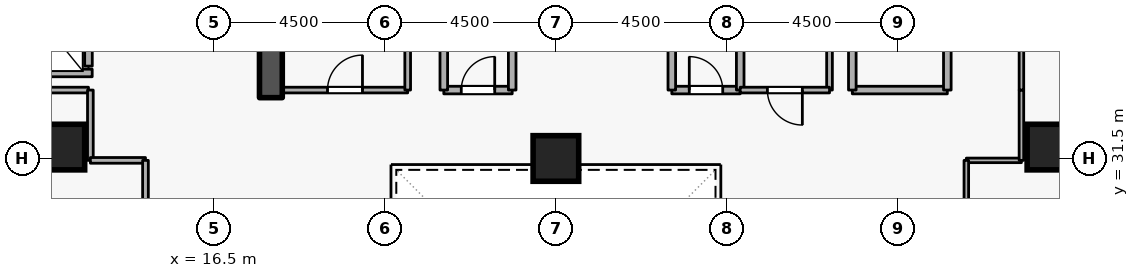
"""IFC4 building model, lengths in metres.
Left out: names, types, materials, properties, quantities, classifications, styles, units other than length and angle.
Written with IfcOpenShell. Run it as: python <this file> out.ifc"""

import sys

from ifc_helpers import new_model, si_unit, direction, frame, frame_2d, origin, origin_2d, place, context, subcontext, project, spatial, rectangle, extrude, element, fill, save


model = new_model("IFC4")
c1 = context("Model", 3, precision=1e-05, world=origin(), true_north=direction((0.0, 1.0)))
c2 = subcontext(c1, "Body", "Model", "MODEL_VIEW")
j1 = project(units=[si_unit("LENGTHUNIT", "METRE"), si_unit("PLANEANGLEUNIT", "RADIAN")], contexts=[c1])
p1 = place(None, origin())
s1 = spatial("IfcSite", under=j1, at=p1, CompositionType="ELEMENT")
p2 = place(p1, origin())
s2 = spatial("IfcBuilding", under=s1, at=p2, CompositionType="ELEMENT")
p3 = place(p2, frame((0.0, 0.0, 101.7)))
s3 = spatial("IfcBuildingStorey", under=s2, at=p3, CompositionType="ELEMENT", Elevation=101.7)
p4 = place(p3, frame((18.0, 33.1, 0.0), z_axis=(0.0, 0.0, 1.0), x_axis=(0.0, 1.0, 0.0)))
e1 = element("IfcWall", 1, at=p4, inside=s3, PredefinedType="SHEAR", context=c2, shape_type="SweptSolid", body=[
    extrude(rectangle(XDim=5.7, YDim=0.6, at=frame_2d((2.85, 0.0))), origin(), (0.0, 0.0, 1.0), 3.6),
])
for number, where, z_axis, x_axis in (
    (2, (12.5, 31.8, 0.0), (0.0, 0.0, 1.0), (1.0, 0.0, 0.0)),
    (3, (38.5, 31.8, 0.0), (0.0, 0.0, 1.0), (1.0, 0.0, 0.0)),
    (4, (25.5, 31.5, 0.0), (0.0, 0.0, 1.0), (1.0, 0.0, 0.0)),
):
    element("IfcColumn", number, at=place(p3, frame(where, z_axis=z_axis, x_axis=x_axis)), inside=s3, PredefinedType="COLUMN", context=c2, shape_type="SweptSolid", body=[
        extrude(rectangle(XDim=1.2, YDim=1.2, at=origin_2d()), origin(), (0.0, 0.0, 1.0), 3.6),
    ])
p5 = place(p3, frame((13.2, 33.93, 0.0), z_axis=(0.0, 0.0, 1.0), x_axis=(0.0, 1.0, 0.0)))
e5 = element("IfcWall", 5, at=p5, inside=s3, PredefinedType="STANDARD", context=c2, shape_type="SweptSolid", body=[
    extrude(rectangle(XDim=1.94, YDim=0.2, at=frame_2d((0.97, 0.0))), origin(), (0.0, 0.0, 1.0), 3.34),
])
p6 = place(p5, frame((0.46, 0.0, 0.0)))
e6 = element("IfcOpeningElement", 6, at=p6, cuts=e5, PredefinedType="OPENING", context=c2, shape_type="SweptSolid", body=[
    extrude(rectangle(XDim=1.02, YDim=2.06, at=frame_2d((0.51, 1.03))), frame((0.0, 0.11, 0.0), z_axis=(0.0, -1.0, 0.0), x_axis=(1.0, 0.0, 0.0)), (0.0, 0.0, 1.0), 0.22),
])
p7 = place(p3, frame((11.002, 33.75, 0.0), z_axis=(0.0, 0.0, 1.0), x_axis=(1.0, 0.0, 0.0)))
e7 = element("IfcWall", 7, at=p7, inside=s3, PredefinedType="STANDARD", context=c2, shape_type="SweptSolid", body=[
    extrude(rectangle(XDim=2.296, YDim=0.2, at=frame_2d((1.148, 0.0))), origin(), (0.0, 0.0, 1.0), 3.34),
])
p8 = place(p3, frame((33.3, 33.3, 0.0), z_axis=(0.0, 0.0, 1.0), x_axis=(1.0, 0.0, 0.0)))
e8 = element("IfcWall", 8, at=p8, inside=s3, PredefinedType="STANDARD", context=c2, shape_type="SweptSolid", body=[
    extrude(rectangle(XDim=2.5, YDim=0.2, at=frame_2d((1.25, 0.0))), origin(), (0.0, 0.0, 1.0), 3.34),
])
p9 = place(p3, frame((35.8, 33.3, 0.0), z_axis=(0.0, 0.0, 1.0), x_axis=(0.0, 1.0, 0.0)))
e9 = element("IfcWall", 9, at=p9, inside=s3, PredefinedType="STANDARD", context=c2, shape_type="SweptSolid", body=[
    extrude(rectangle(XDim=5.7, YDim=0.2, at=frame_2d((2.85, 0.0))), origin(), (0.0, 0.0, 1.0), 3.34),
])
p10 = place(p9, frame((2.275, 0.0, 0.0)))
e10 = element("IfcOpeningElement", 10, at=p10, cuts=e9, PredefinedType="OPENING", context=c2, shape_type="SweptSolid", body=[
    extrude(rectangle(XDim=1.15, YDim=2.1, at=frame_2d((0.575, 1.05))), frame((0.0, 0.11, 0.0), z_axis=(0.0, -1.0, 0.0), x_axis=(1.0, 0.0, 0.0)), (0.0, 0.0, 1.0), 0.22),
])
p11 = place(p3, frame((33.3, 35.6, 0.0), z_axis=(0.0, 0.0, 1.0), x_axis=(0.0, -1.0, 0.0)))
e11 = element("IfcWall", 11, at=p11, inside=s3, PredefinedType="STANDARD", context=c2, shape_type="SweptSolid", body=[
    extrude(rectangle(XDim=2.3, YDim=0.2, at=frame_2d((1.15, 0.0))), origin(), (0.0, 0.0, 1.0), 2.545),
])
p12 = place(p3, frame((22.55, 33.3, 0.0), z_axis=(0.0, 0.0, 1.0), x_axis=(1.0, 0.0, 0.0)))
e12 = element("IfcWall", 12, at=p12, inside=s3, PredefinedType="STANDARD", context=c2, shape_type="SweptSolid", body=[
    extrude(rectangle(XDim=1.8, YDim=0.2, at=frame_2d((0.9, 0.0))), origin(), (0.0, 0.0, 1.0), 3.34),
])
p13 = place(p12, frame((0.46, 0.0, 0.0)))
e13 = element("IfcOpeningElement", 13, at=p13, cuts=e12, PredefinedType="OPENING", context=c2, shape_type="SweptSolid", body=[
    extrude(rectangle(XDim=0.88, YDim=2.04, at=frame_2d((0.44, 1.02))), frame((0.0, 0.11, 0.0), z_axis=(0.0, -1.0, 0.0), x_axis=(1.0, 0.0, 0.0)), (0.0, 0.0, 1.0), 0.22),
])
for number, where, z_axis, x_axis in (
    (14, (24.35, 33.3, 0.0), (0.0, 0.0, 1.0), (0.0, 1.0, 0.0)),
    (15, (22.55, 35.35, 0.0), (0.0, 0.0, 1.0), (0.0, -1.0, 0.0)),
):
    element("IfcWall", number, at=place(p3, frame(where, z_axis=z_axis, x_axis=x_axis)), inside=s3, PredefinedType="STANDARD", context=c2, shape_type="SweptSolid", body=[
        extrude(rectangle(XDim=2.05, YDim=0.2, at=frame_2d((1.025, 0.0))), origin(), (0.0, 0.0, 1.0), 3.34),
    ])
p14 = place(p3, frame((28.55, 33.3, 0.0), z_axis=(0.0, 0.0, 1.0), x_axis=(1.0, 0.0, 0.0)))
e16 = element("IfcWall", 16, at=p14, inside=s3, PredefinedType="STANDARD", context=c2, shape_type="SweptSolid", body=[
    extrude(rectangle(XDim=1.8, YDim=0.2, at=frame_2d((0.9, 0.0))), origin(), (0.0, 0.0, 1.0), 3.34),
])
p15 = place(p14, frame((0.46, 0.0, 0.0)))
e17 = element("IfcOpeningElement", 17, at=p15, cuts=e16, PredefinedType="OPENING", context=c2, shape_type="SweptSolid", body=[
    extrude(rectangle(XDim=0.88, YDim=2.04, at=frame_2d((0.44, 1.02))), frame((0.0, 0.11, 0.0), z_axis=(0.0, -1.0, 0.0), x_axis=(1.0, 0.0, 0.0)), (0.0, 0.0, 1.0), 0.22),
])
for number, where, z_axis, x_axis in (
    (18, (30.35, 33.3, 0.0), (0.0, 0.0, 1.0), (0.0, 1.0, 0.0)),
    (19, (28.55, 35.35, 0.0), (0.0, 0.0, 1.0), (0.0, -1.0, 0.0)),
):
    element("IfcWall", number, at=place(p3, frame(where, z_axis=z_axis, x_axis=x_axis)), inside=s3, PredefinedType="STANDARD", context=c2, shape_type="SweptSolid", body=[
        extrude(rectangle(XDim=2.05, YDim=0.2, at=frame_2d((1.025, 0.0))), origin(), (0.0, 0.0, 1.0), 3.34),
    ])
p16 = place(p3, frame((18.3, 33.3, 0.0), z_axis=(0.0, 0.0, 1.0), x_axis=(1.0, 0.0, 0.0)))
e20 = element("IfcWall", 20, at=p16, inside=s3, PredefinedType="PARTITIONING", context=c2, shape_type="SweptSolid", body=[
    extrude(rectangle(XDim=3.3, YDim=0.15, at=frame_2d((1.65, 0.0))), origin(), (0.0, 0.0, 1.0), 3.34),
])
p17 = place(p16, frame((1.19, 0.0, 0.0)))
e21 = element("IfcOpeningElement", 21, at=p17, cuts=e20, PredefinedType="OPENING", context=c2, shape_type="SweptSolid", body=[
    extrude(rectangle(XDim=0.92, YDim=2.08, at=frame_2d((0.46, 1.04))), frame((0.0, 0.085, 0.0), z_axis=(0.0, -1.0, 0.0), x_axis=(1.0, 0.0, 0.0)), (0.0, 0.0, 1.0), 0.17),
])
p18 = place(p3, frame((21.6, 33.3, 0.0), z_axis=(0.0, 0.0, 1.0), x_axis=(0.0, 1.0, 0.0)))
e22 = element("IfcWall", 22, at=p18, inside=s3, PredefinedType="PARTITIONING", context=c2, shape_type="SweptSolid", body=[
    extrude(rectangle(XDim=2.05, YDim=0.15, at=frame_2d((1.025, 0.0))), origin(), (0.0, 0.0, 1.0), 3.34),
])
p19 = place(p3, frame((32.7, 35.35, 0.0), z_axis=(0.0, 0.0, 1.0), x_axis=(0.0, -1.0, 0.0)))
e23 = element("IfcWall", 23, at=p19, inside=s3, PredefinedType="PARTITIONING", context=c2, shape_type="SweptSolid", body=[
    extrude(rectangle(XDim=2.05, YDim=0.15, at=frame_2d((1.025, 0.0))), origin(), (0.0, 0.0, 1.0), 2.545),
])
p20 = place(p3, frame((32.7, 33.3, 0.0), z_axis=(0.0, 0.0, 1.0), x_axis=(-1.0, 0.0, 0.0)))
e24 = element("IfcWall", 24, at=p20, inside=s3, PredefinedType="PARTITIONING", context=c2, shape_type="SweptSolid", body=[
    extrude(rectangle(XDim=2.35, YDim=0.15, at=frame_2d((1.175, 0.0))), origin(), (0.0, 0.0, 1.0), 3.34),
])
p21 = place(p20, frame((0.715, 0.0, 0.0)))
e25 = element("IfcOpeningElement", 25, at=p21, cuts=e24, PredefinedType="OPENING", context=c2, shape_type="SweptSolid", body=[
    extrude(rectangle(XDim=0.92, YDim=2.08, at=frame_2d((0.46, 1.04))), frame((0.0, 0.085, 0.0), z_axis=(0.0, -1.0, 0.0), x_axis=(1.0, 0.0, 0.0)), (0.0, 0.0, 1.0), 0.17),
])
p22 = place(p3, frame((10.9, 33.3, 0.0), z_axis=(0.0, 0.0, 1.0), x_axis=(1.0, 0.0, 0.0)))
e26 = element("IfcWall", 26, at=p22, inside=s3, PredefinedType="PARTITIONING", context=c2, shape_type="SweptSolid", body=[
    extrude(rectangle(XDim=2.3, YDim=0.15, at=frame_2d((1.15, 0.0))), origin(), (0.0, 0.0, 1.0), 3.34),
])
p23 = place(p3, frame((13.25, 33.3, 0.0), z_axis=(0.0, 0.0, 1.0), x_axis=(0.0, -1.0, 0.0)))
e27 = element("IfcWall", 27, at=p23, inside=s3, PredefinedType="PARTITIONING", context=c2, shape_type="SweptSolid", body=[
    extrude(rectangle(XDim=1.85, YDim=0.15, at=frame_2d((0.925, 0.0))), origin(), (0.0, 0.0, 1.0), 3.34),
])
p24 = place(p3, frame((13.25, 31.45, 0.0), z_axis=(0.0, 0.0, 1.0), x_axis=(1.0, 0.0, 0.0)))
e28 = element("IfcWall", 28, at=p24, inside=s3, PredefinedType="PARTITIONING", context=c2, shape_type="SweptSolid", body=[
    extrude(rectangle(XDim=1.45, YDim=0.15, at=frame_2d((0.725, 0.0))), origin(), (0.0, 0.0, 1.0), 3.34),
])
p25 = place(p3, frame((14.7, 31.45, 0.0), z_axis=(0.0, 0.0, 1.0), x_axis=(0.0, -1.0, 0.0)))
e29 = element("IfcWall", 29, at=p25, inside=s3, PredefinedType="PARTITIONING", context=c2, shape_type="SweptSolid", body=[
    extrude(rectangle(XDim=4.45, YDim=0.15, at=frame_2d((2.225, 0.0))), origin(), (0.0, 0.0, 1.0), 3.34),
])
p26 = place(p25, frame((1.575, 0.0, 0.0)))
e30 = element("IfcOpeningElement", 30, at=p26, cuts=e29, PredefinedType="OPENING", context=c2, shape_type="SweptSolid", body=[
    extrude(rectangle(XDim=1.3, YDim=2.12, at=frame_2d((0.65, 1.06))), frame((0.0, 0.085, 0.0), z_axis=(0.0, -1.0, 0.0), x_axis=(1.0, 0.0, 0.0)), (0.0, 0.0, 1.0), 0.17),
])
p27 = place(p3, frame((36.3, 31.45, 0.0), z_axis=(0.0, 0.0, 1.0), x_axis=(1.0, 0.0, 0.0)))
e31 = element("IfcWall", 31, at=p27, inside=s3, PredefinedType="PARTITIONING", context=c2, shape_type="SweptSolid", body=[
    extrude(rectangle(XDim=1.45, YDim=0.12, at=frame_2d((0.725, 0.0))), origin(), (0.0, 0.0, 1.0), 3.34),
])
p28 = place(p3, frame((37.75, 31.45, 0.0), z_axis=(0.0, 0.0, 1.0), x_axis=(0.0, 1.0, 0.0)))
e32 = element("IfcWall", 32, at=p28, inside=s3, PredefinedType="PARTITIONING", context=c2, shape_type="SweptSolid", body=[
    extrude(rectangle(XDim=1.85, YDim=0.12, at=frame_2d((0.925, 0.0))), origin(), (0.0, 0.0, 1.0), 3.34),
])
p29 = place(p3, frame((37.75, 33.3, 0.0), z_axis=(0.0, 0.0, 1.0), x_axis=(0.0, 1.0, 0.0)))
e33 = element("IfcWall", 33, at=p29, inside=s3, PredefinedType="PARTITIONING", context=c2, shape_type="SweptSolid", body=[
    extrude(rectangle(XDim=9.35, YDim=0.12, at=frame_2d((4.675, 0.0))), origin(), (0.0, 0.0, 1.0), 3.34),
])
p30 = place(p29, frame((4.15, 0.0, 0.0)))
e34 = element("IfcOpeningElement", 34, at=p30, cuts=e33, PredefinedType="OPENING", context=c2, shape_type="SweptSolid", body=[
    extrude(rectangle(XDim=1.05, YDim=2.1, at=frame_2d((0.525, 1.05))), frame((0.0, 0.07, 0.0), z_axis=(0.0, -1.0, 0.0), x_axis=(1.0, 0.0, 0.0)), (0.0, 0.0, 1.0), 0.14),
])
p31 = place(p3, frame((36.3, 27.0, 0.0), z_axis=(0.0, 0.0, 1.0), x_axis=(0.0, 1.0, 0.0)))
e35 = element("IfcWall", 35, at=p31, inside=s3, PredefinedType="PARTITIONING", context=c2, shape_type="SweptSolid", body=[
    extrude(rectangle(XDim=4.45, YDim=0.12, at=frame_2d((2.225, 0.0))), origin(), (0.0, 0.0, 1.0), 3.34),
])
p32 = place(p13, origin())
e36 = element("IfcDoor", 36, at=p32, inside=s3, OperationType="SINGLE_SWING_RIGHT", PredefinedType="DOOR", context=c2, shape_type="SweptSolid", body=[
    extrude(rectangle(XDim=0.88, YDim=2.04, at=frame_2d((0.44, 1.02))), frame((0.0, 0.025, 0.0), z_axis=(0.0, -1.0, 0.0), x_axis=(1.0, 0.0, 0.0)), (0.0, 0.0, 1.0), 0.05),
])
fill(e13, e36)
p33 = place(p15, origin())
e37 = element("IfcDoor", 37, at=p33, inside=s3, OperationType="SINGLE_SWING_LEFT", PredefinedType="DOOR", context=c2, shape_type="SweptSolid", body=[
    extrude(rectangle(XDim=0.88, YDim=2.04, at=frame_2d((0.44, 1.02))), frame((0.0, 0.025, 0.0), z_axis=(0.0, -1.0, 0.0), x_axis=(1.0, 0.0, 0.0)), (0.0, 0.0, 1.0), 0.05),
])
fill(e17, e37)
p34 = place(p17, origin())
e38 = element("IfcDoor", 38, at=p34, inside=s3, OperationType="SINGLE_SWING_RIGHT", PredefinedType="DOOR", context=c2, shape_type="SweptSolid", body=[
    extrude(rectangle(XDim=0.92, YDim=2.08, at=frame_2d((0.46, 1.04))), frame((0.0, 0.025, 0.0), z_axis=(0.0, -1.0, 0.0), x_axis=(1.0, 0.0, 0.0)), (0.0, 0.0, 1.0), 0.05),
])
fill(e21, e38)
p35 = place(p21, origin())
e39 = element("IfcDoor", 39, at=p35, inside=s3, OperationType="SINGLE_SWING_LEFT", PredefinedType="DOOR", context=c2, shape_type="SweptSolid", body=[
    extrude(rectangle(XDim=0.92, YDim=2.08, at=frame_2d((0.46, 1.04))), frame((0.0, 0.025, 0.0), z_axis=(0.0, -1.0, 0.0), x_axis=(1.0, 0.0, 0.0)), (0.0, 0.0, 1.0), 0.05),
])
fill(e25, e39)
save(model, sys.argv[1])
